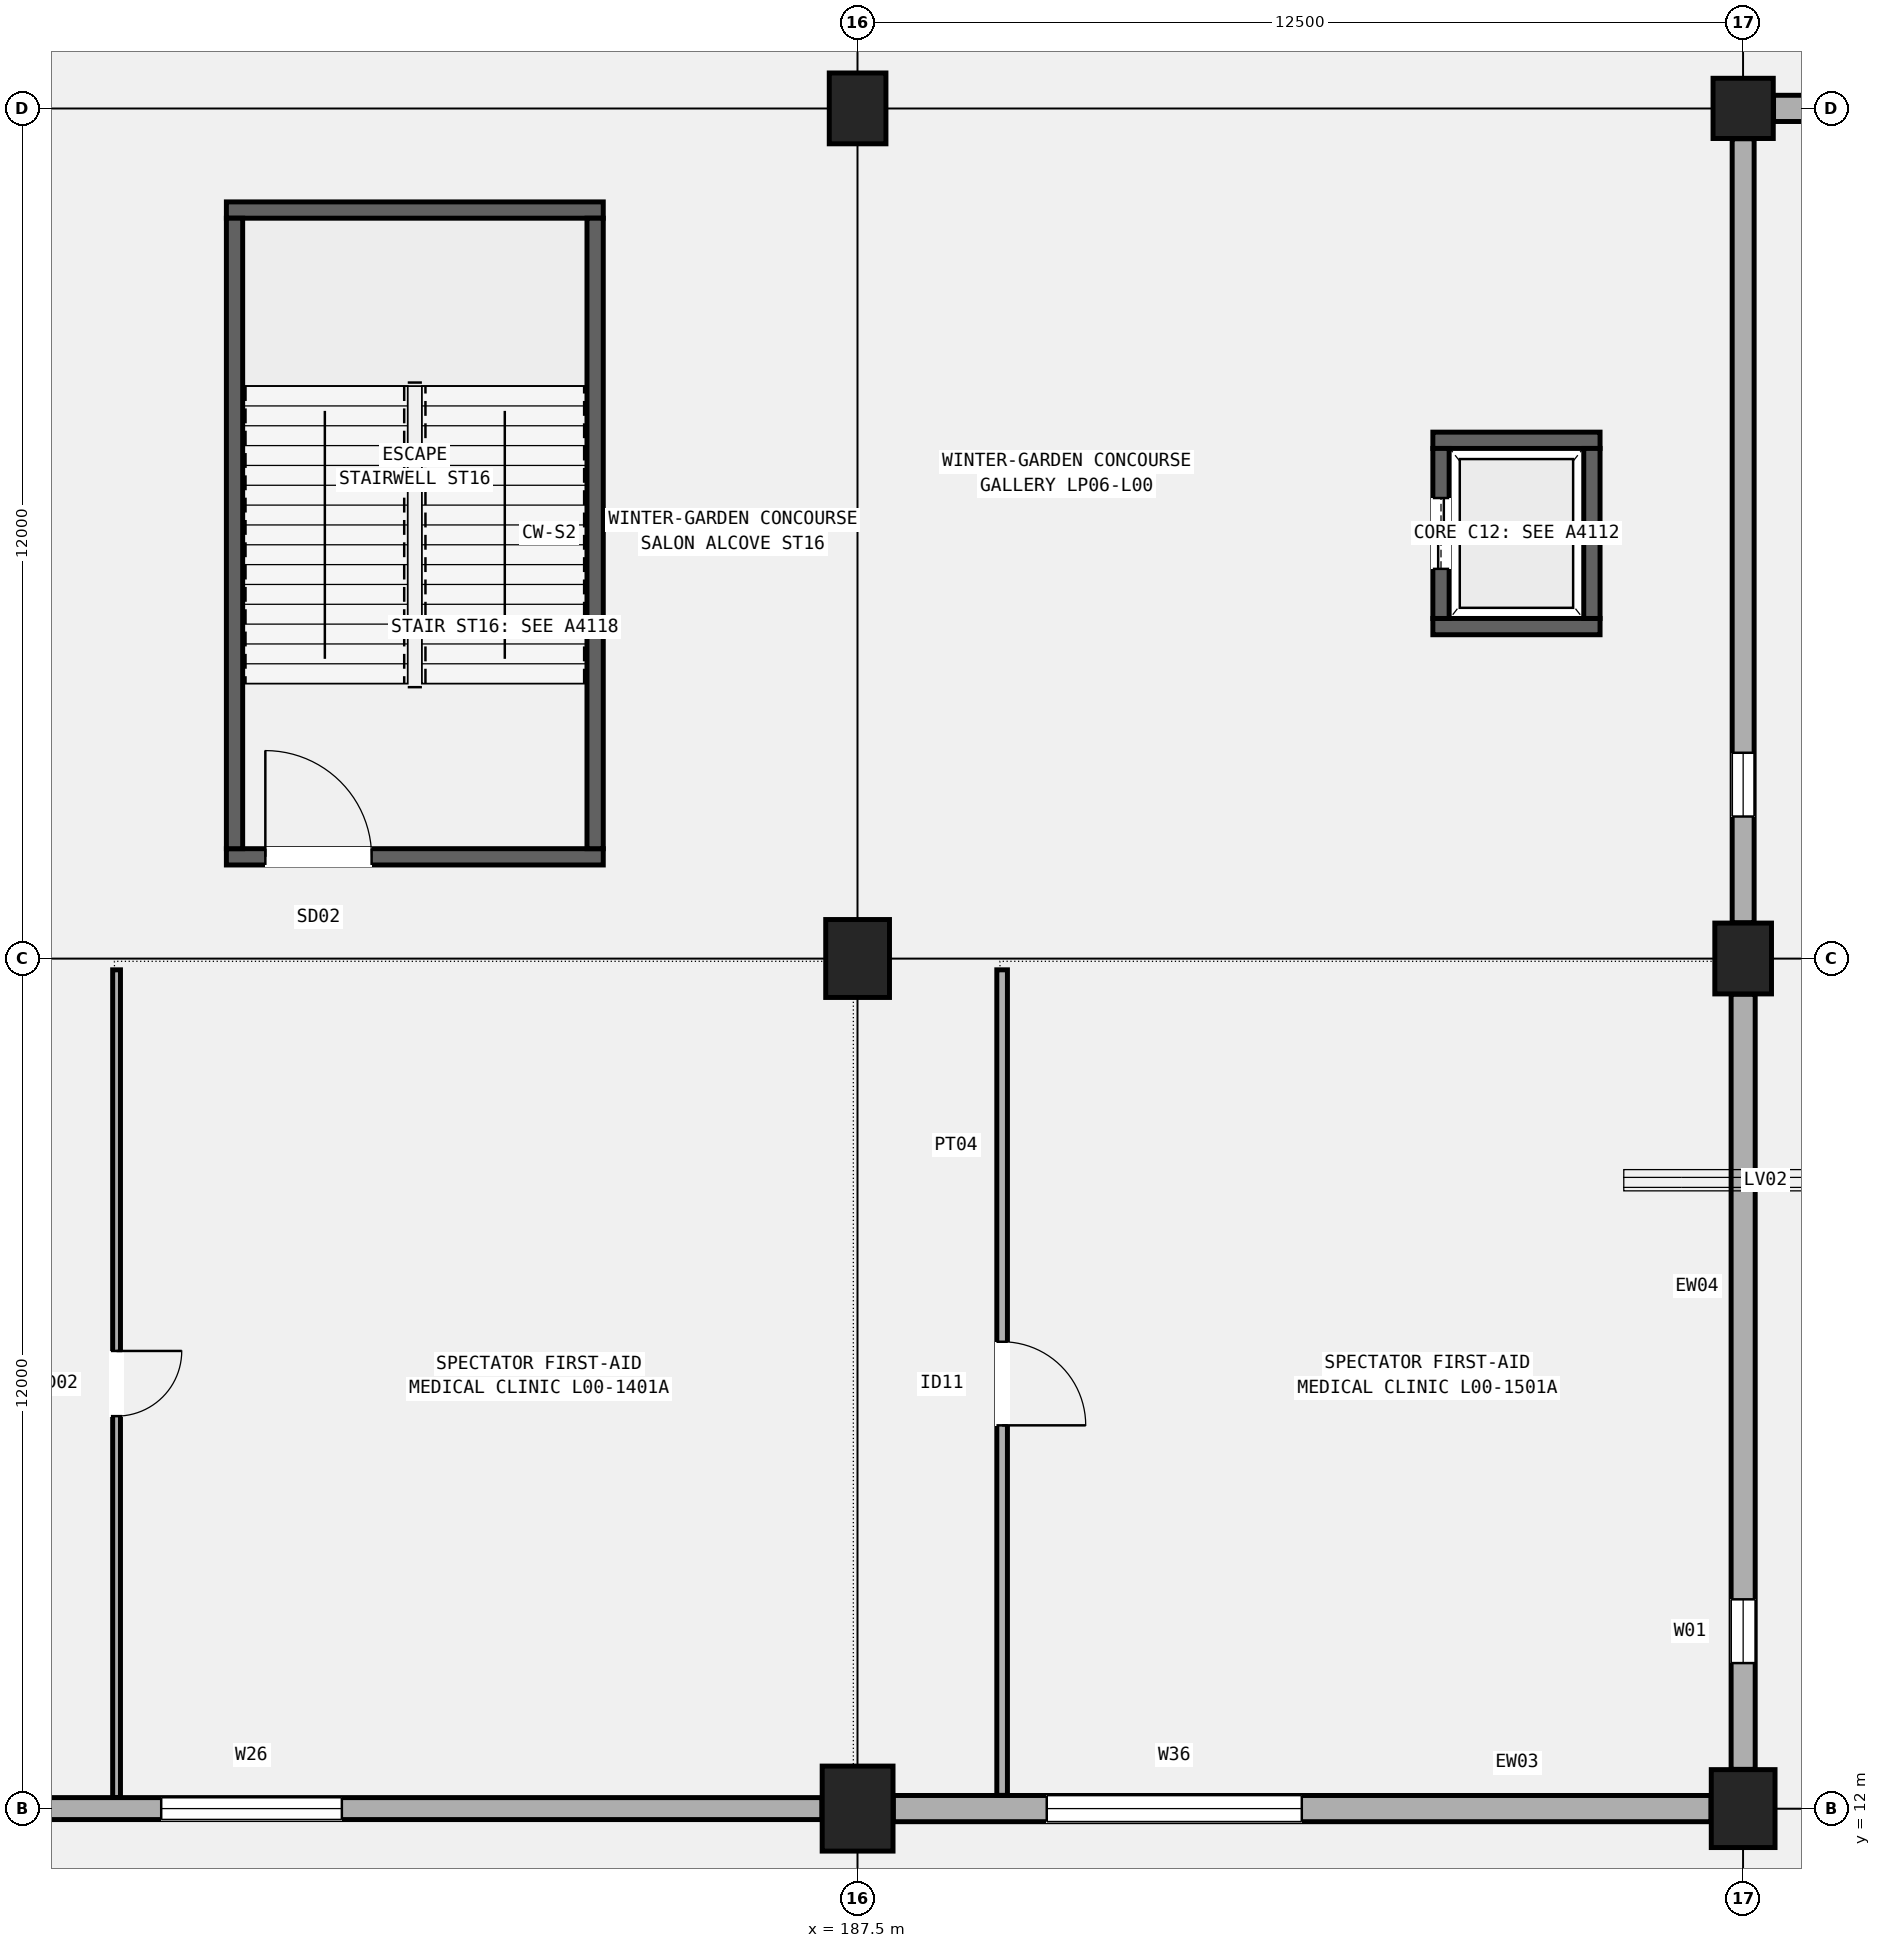
"""IFC4 building model, lengths in metres.
Left out: names, types, materials, properties, quantities, classifications, styles, units other than length and angle.
Written with IfcOpenShell. Run it as: python <this file> out.ifc"""

import sys

from ifc_helpers import new_model, si_unit, direction, frame, frame_2d, origin, origin_2d, place, context, subcontext, project, spatial, rectangle, circle, extrude, element, fill, save


model = new_model("IFC4")
c1 = context("Model", 3, precision=1e-05, world=origin(), true_north=direction((0.0, 1.0)))
c2 = subcontext(c1, "Body", "Model", "MODEL_VIEW")
j1 = project(units=[si_unit("LENGTHUNIT", "METRE"), si_unit("PLANEANGLEUNIT", "RADIAN")], contexts=[c1])
p1 = place(None, origin())
s1 = spatial("IfcSite", under=j1, at=p1, CompositionType="ELEMENT")
p2 = place(p1, origin())
s2 = spatial("IfcBuilding", under=s1, at=p2, CompositionType="ELEMENT")
p3 = place(p2, origin())
s3 = spatial("IfcBuildingStorey", under=s2, at=p3, CompositionType="ELEMENT", Elevation=0.0)
p4 = place(p3, frame((187.5, 12.0, 0.0), z_axis=(0.0, 0.0, 1.0), x_axis=(1.0, 0.0, 0.0)))
e1 = element("IfcColumn", 1, at=p4, inside=s3, PredefinedType="COLUMN", context=c2, shape_type="SweptSolid", body=[
    extrude(rectangle(XDim=1.0, YDim=1.2, at=origin_2d()), origin(), (0.0, 0.0, 1.0), 5.4),
])
p5 = place(p3, frame((187.5, 24.0, 0.0), z_axis=(0.0, 0.0, 1.0), x_axis=(1.0, 0.0, 0.0)))
e2 = element("IfcColumn", 2, at=p5, inside=s3, PredefinedType="COLUMN", context=c2, shape_type="SweptSolid", body=[
    extrude(rectangle(XDim=0.9, YDim=1.1, at=origin_2d()), origin(), (0.0, 0.0, 1.0), 5.4),
])
p6 = place(p3, frame((187.5, 36.0, 0.0), z_axis=(0.0, 0.0, 1.0), x_axis=(1.0, 0.0, 0.0)))
e3 = element("IfcColumn", 3, at=p6, inside=s3, PredefinedType="COLUMN", context=c2, shape_type="SweptSolid", body=[
    extrude(rectangle(XDim=0.8, YDim=1.0, at=origin_2d()), origin(), (0.0, 0.0, 1.0), 5.4),
])
p7 = place(p3, frame((200.0, 12.0, 0.0), z_axis=(0.0, 0.0, 1.0), x_axis=(1.0, 0.0, 0.0)))
e4 = element("IfcColumn", 4, at=p7, inside=s3, PredefinedType="COLUMN", context=c2, shape_type="SweptSolid", body=[
    extrude(rectangle(XDim=0.9, YDim=1.1, at=origin_2d()), origin(), (0.0, 0.0, 1.0), 5.4),
])
p8 = place(p3, frame((200.0, 24.0, 0.0), z_axis=(0.0, 0.0, 1.0), x_axis=(1.0, 0.0, 0.0)))
e5 = element("IfcColumn", 5, at=p8, inside=s3, PredefinedType="COLUMN", context=c2, shape_type="SweptSolid", body=[
    extrude(rectangle(XDim=0.8, YDim=1.0, at=origin_2d()), origin(), (0.0, 0.0, 1.0), 5.4),
])
p9 = place(p3, frame((200.0, 36.0, 0.0), z_axis=(0.0, 0.0, 1.0), x_axis=(1.0, 0.0, 0.0)))
e6 = element("IfcColumn", 6, at=p9, inside=s3, PredefinedType="COLUMN", context=c2, shape_type="SweptSolid", body=[
    extrude(circle(Radius=0.425, at=origin_2d()), origin(), (0.0, 0.0, 1.0), 5.4),
])
p10 = place(p3, frame((175.429, 12.0, 0.0), z_axis=(0.0, 0.0, 1.0), x_axis=(1.0, 0.0, 0.0)))
e7 = element("IfcWall", 7, at=p10, inside=s3, PredefinedType="SOLIDWALL", context=c2, shape_type="SweptSolid", body=[
    extrude(rectangle(XDim=11.567, YDim=0.31, at=frame_2d((5.784, 0.0))), origin(), (0.0, 0.0, 1.0), 4.34),
])
p11 = place(p10, frame((2.241, 0.0, 0.95)))
e8 = element("IfcOpeningElement", 8, at=p11, cuts=e7, PredefinedType="OPENING", context=c2, shape_type="SweptSolid", body=[
    extrude(rectangle(XDim=2.55, YDim=1.95, at=frame_2d((1.275, 0.975))), frame((0.0, 0.165, 0.0), z_axis=(0.0, -1.0, 0.0), x_axis=(1.0, 0.0, 0.0)), (0.0, 0.0, 1.0), 0.33),
])
p12 = place(p3, frame((188.004, 12.0, 0.0), z_axis=(0.0, 0.0, 1.0), x_axis=(1.0, 0.0, 0.0)))
e9 = element("IfcWall", 9, at=p12, inside=s3, PredefinedType="SOLIDWALL", context=c2, shape_type="SweptSolid", body=[
    extrude(rectangle(XDim=11.542, YDim=0.37, at=frame_2d((5.771, 0.0))), origin(), (0.0, 0.0, 1.0), 4.09),
])
p13 = place(p12, frame((2.166, 0.0, 0.95)))
e10 = element("IfcOpeningElement", 10, at=p13, cuts=e9, PredefinedType="OPENING", context=c2, shape_type="SweptSolid", body=[
    extrude(rectangle(XDim=3.6, YDim=2.15, at=frame_2d((1.8, 1.075))), frame((0.0, 0.195, 0.0), z_axis=(0.0, -1.0, 0.0), x_axis=(1.0, 0.0, 0.0)), (0.0, 0.0, 1.0), 0.39),
])
p14 = place(p3, frame((200.0, 12.554, 0.0), z_axis=(0.0, 0.0, 1.0), x_axis=(0.0, 1.0, 0.0)))
e11 = element("IfcWall", 11, at=p14, inside=s3, PredefinedType="SOLIDWALL", context=c2, shape_type="SweptSolid", body=[
    extrude(rectangle(XDim=10.942, YDim=0.34, at=frame_2d((5.471, 0.0))), origin(), (0.0, 0.0, 1.0), 4.44),
])
p15 = place(p14, frame((1.5, 0.0, 0.95)))
e12 = element("IfcOpeningElement", 12, at=p15, cuts=e11, PredefinedType="OPENING", context=c2, shape_type="SweptSolid", body=[
    extrude(rectangle(XDim=0.9, YDim=2.1, at=frame_2d((0.45, 1.05))), frame((0.0, 0.18, 0.0), z_axis=(0.0, -1.0, 0.0), x_axis=(1.0, 0.0, 0.0)), (0.0, 0.0, 1.0), 0.36),
])
p16 = place(p3, frame((200.0, 24.504, 0.0), z_axis=(0.0, 0.0, 1.0), x_axis=(0.0, 1.0, 0.0)))
e13 = element("IfcWall", 13, at=p16, inside=s3, PredefinedType="SOLIDWALL", context=c2, shape_type="SweptSolid", body=[
    extrude(rectangle(XDim=11.067, YDim=0.31, at=frame_2d((5.534, 0.0))), origin(), (0.0, 0.0, 1.0), 4.24),
])
p17 = place(p16, frame((1.5, 0.0, 0.95)))
e14 = element("IfcOpeningElement", 14, at=p17, cuts=e13, PredefinedType="OPENING", context=c2, shape_type="SweptSolid", body=[
    extrude(rectangle(XDim=0.9, YDim=2.4, at=frame_2d((0.45, 1.2))), frame((0.0, 0.165, 0.0), z_axis=(0.0, -1.0, 0.0), x_axis=(1.0, 0.0, 0.0)), (0.0, 0.0, 1.0), 0.33),
])
p18 = place(p3, frame((200.429, 36.0, 0.0), z_axis=(0.0, 0.0, 1.0), x_axis=(1.0, 0.0, 0.0)))
e15 = element("IfcWall", 15, at=p18, inside=s3, PredefinedType="SOLIDWALL", context=c2, shape_type="SweptSolid", body=[
    extrude(rectangle(XDim=11.067, YDim=0.37, at=frame_2d((5.534, 0.0))), origin(), (0.0, 0.0, 1.0), 4.34),
])
p19 = place(p18, frame((1.5, 0.0, 0.95)))
e16 = element("IfcOpeningElement", 16, at=p19, cuts=e15, PredefinedType="OPENING", context=c2, shape_type="SweptSolid", body=[
    extrude(rectangle(XDim=1.2, YDim=2.3, at=frame_2d((0.6, 1.15))), frame((0.0, 0.195, 0.0), z_axis=(0.0, -1.0, 0.0), x_axis=(1.0, 0.0, 0.0)), (0.0, 0.0, 1.0), 0.39),
])
p20 = place(p3, frame((178.59, 25.435, 0.0), z_axis=(0.0, 0.0, 1.0), x_axis=(1.0, 0.0, 0.0)))
e17 = element("IfcWall", 17, at=p20, inside=s3, PredefinedType="SHEAR", context=c2, shape_type="SweptSolid", body=[
    extrude(rectangle(XDim=5.32, YDim=0.23, at=frame_2d((2.66, 0.0))), origin(), (0.0, 0.0, 1.0), 5.14),
])
p21 = place(p20, frame((0.55, 0.0, 0.0)))
e18 = element("IfcOpeningElement", 18, at=p21, cuts=e17, PredefinedType="OPENING", context=c2, shape_type="SweptSolid", body=[
    extrude(rectangle(XDim=1.5, YDim=2.2, at=frame_2d((0.75, 1.1))), frame((0.0, 0.125, 0.0), z_axis=(0.0, -1.0, 0.0), x_axis=(1.0, 0.0, 0.0)), (0.0, 0.0, 1.0), 0.25),
])
p22 = place(p3, frame((178.59, 34.565, 0.0), z_axis=(0.0, 0.0, 1.0), x_axis=(1.0, 0.0, 0.0)))
e19 = element("IfcWall", 19, at=p22, inside=s3, PredefinedType="SHEAR", context=c2, shape_type="SweptSolid", body=[
    extrude(rectangle(XDim=5.32, YDim=0.23, at=frame_2d((2.66, 0.0))), origin(), (0.0, 0.0, 1.0), 5.14),
])
for number, where, z_axis, x_axis in (
    (20, (178.705, 25.55, 0.0), (0.0, 0.0, 1.0), (0.0, 1.0, 0.0)),
    (21, (183.795, 25.55, 0.0), (0.0, 0.0, 1.0), (0.0, 1.0, 0.0)),
):
    element("IfcWall", number, at=place(p3, frame(where, z_axis=z_axis, x_axis=x_axis)), inside=s3, PredefinedType="SHEAR", context=c2, shape_type="SweptSolid", body=[
        extrude(rectangle(XDim=8.9, YDim=0.23, at=frame_2d((4.45, 0.0))), origin(), (0.0, 0.0, 1.0), 5.14),
    ])
for number, where, z_axis, x_axis in (
    (22, (195.62, 28.685, 0.0), (0.0, 0.0, 1.0), (1.0, 0.0, 0.0)),
    (23, (195.62, 31.315, 0.0), (0.0, 0.0, 1.0), (1.0, 0.0, 0.0)),
):
    element("IfcWall", number, at=place(p3, frame(where, z_axis=z_axis, x_axis=x_axis)), inside=s3, PredefinedType="SHEAR", context=c2, shape_type="SweptSolid", body=[
        extrude(rectangle(XDim=2.36, YDim=0.23, at=frame_2d((1.18, 0.0))), origin(), (0.0, 0.0, 1.0), 5.14),
    ])
p23 = place(p3, frame((195.735, 28.8, 0.0), z_axis=(0.0, 0.0, 1.0), x_axis=(0.0, 1.0, 0.0)))
e24 = element("IfcWall", 24, at=p23, inside=s3, PredefinedType="SHEAR", context=c2, shape_type="SweptSolid", body=[
    extrude(rectangle(XDim=2.4, YDim=0.23, at=frame_2d((1.2, 0.0))), origin(), (0.0, 0.0, 1.0), 5.14),
])
p24 = place(p23, frame((0.7, 0.0, 0.0)))
e25 = element("IfcOpeningElement", 25, at=p24, cuts=e24, PredefinedType="OPENING", context=c2, shape_type="SweptSolid", body=[
    extrude(rectangle(XDim=1.0, YDim=2.15, at=frame_2d((0.5, 1.075))), frame((0.0, 0.125, 0.0), z_axis=(0.0, -1.0, 0.0), x_axis=(1.0, 0.0, 0.0)), (0.0, 0.0, 1.0), 0.25),
])
p25 = place(p3, frame((197.865, 28.8, 0.0), z_axis=(0.0, 0.0, 1.0), x_axis=(0.0, 1.0, 0.0)))
e26 = element("IfcWall", 26, at=p25, inside=s3, PredefinedType="SHEAR", context=c2, shape_type="SweptSolid", body=[
    extrude(rectangle(XDim=2.4, YDim=0.23, at=frame_2d((1.2, 0.0))), origin(), (0.0, 0.0, 1.0), 5.14),
])
p26 = place(p3, frame((177.04, 12.157, 0.0), z_axis=(0.0, 0.0, 1.0), x_axis=(0.0, 1.0, 0.0)))
e27 = element("IfcWall", 27, at=p26, inside=s3, PredefinedType="PARTITIONING", context=c2, shape_type="SweptSolid", body=[
    extrude(rectangle(XDim=11.683, YDim=0.11, at=frame_2d((5.842, 0.0))), origin(), (0.0, 0.0, 1.0), 4.52),
])
p27 = place(p26, frame((6.303, 0.0, 0.0), z_axis=(0.0, 0.0, 1.0), x_axis=(-1.0, 0.0, 0.0)))
e28 = element("IfcOpeningElement", 28, at=p27, cuts=e27, PredefinedType="OPENING", context=c2, shape_type="SweptSolid", body=[
    extrude(rectangle(XDim=0.92, YDim=2.1, at=frame_2d((0.46, 1.05))), frame((0.0, 0.065, 0.0), z_axis=(0.0, -1.0, 0.0), x_axis=(1.0, 0.0, 0.0)), (0.0, 0.0, 1.0), 0.13),
])
p28 = place(p3, frame((189.54, 12.187, 0.0), z_axis=(0.0, 0.0, 1.0), x_axis=(0.0, 1.0, 0.0)))
e29 = element("IfcWall", 29, at=p28, inside=s3, PredefinedType="PARTITIONING", context=c2, shape_type="SweptSolid", body=[
    extrude(rectangle(XDim=11.653, YDim=0.15, at=frame_2d((5.827, 0.0))), origin(), (0.0, 0.0, 1.0), 4.52),
])
p29 = place(p28, frame((6.403, 0.0, 0.0), z_axis=(0.0, 0.0, 1.0), x_axis=(-1.0, 0.0, 0.0)))
e30 = element("IfcOpeningElement", 30, at=p29, cuts=e29, PredefinedType="OPENING", context=c2, shape_type="SweptSolid", body=[
    extrude(rectangle(XDim=1.18, YDim=2.2, at=frame_2d((0.59, 1.1))), frame((0.0, 0.085, 0.0), z_axis=(0.0, -1.0, 0.0), x_axis=(1.0, 0.0, 0.0)), (0.0, 0.0, 1.0), 0.17),
])
p30 = place(p11, origin())
e31 = element("IfcWindow", 31, at=p30, inside=s3, PartitioningType="SINGLE_PANEL", PredefinedType="WINDOW", context=c2, shape_type="SweptSolid", body=[
    extrude(rectangle(XDim=2.55, YDim=1.95, at=frame_2d((1.275, 0.975))), frame((0.0, 0.03, 0.0), z_axis=(0.0, -1.0, 0.0), x_axis=(1.0, 0.0, 0.0)), (0.0, 0.0, 1.0), 0.06),
])
fill(e8, e31)
p31 = place(p13, origin())
e32 = element("IfcWindow", 32, at=p31, inside=s3, PartitioningType="SINGLE_PANEL", PredefinedType="WINDOW", context=c2, shape_type="SweptSolid", body=[
    extrude(rectangle(XDim=3.6, YDim=2.15, at=frame_2d((1.8, 1.075))), frame((0.0, 0.03, 0.0), z_axis=(0.0, -1.0, 0.0), x_axis=(1.0, 0.0, 0.0)), (0.0, 0.0, 1.0), 0.06),
])
fill(e10, e32)
p32 = place(p15, origin())
e33 = element("IfcWindow", 33, at=p32, inside=s3, PartitioningType="SINGLE_PANEL", PredefinedType="WINDOW", context=c2, shape_type="SweptSolid", body=[
    extrude(rectangle(XDim=0.9, YDim=2.1, at=frame_2d((0.45, 1.05))), frame((0.0, 0.03, 0.0), z_axis=(0.0, -1.0, 0.0), x_axis=(1.0, 0.0, 0.0)), (0.0, 0.0, 1.0), 0.06),
])
fill(e12, e33)
p33 = place(p17, origin())
e34 = element("IfcWindow", 34, at=p33, inside=s3, PartitioningType="SINGLE_PANEL", PredefinedType="WINDOW", context=c2, shape_type="SweptSolid", body=[
    extrude(rectangle(XDim=0.9, YDim=2.4, at=frame_2d((0.45, 1.2))), frame((0.0, 0.03, 0.0), z_axis=(0.0, -1.0, 0.0), x_axis=(1.0, 0.0, 0.0)), (0.0, 0.0, 1.0), 0.06),
])
fill(e14, e34)
p34 = place(p21, origin())
e35 = element("IfcDoor", 35, at=p34, inside=s3, OperationType="SINGLE_SWING_LEFT", PredefinedType="DOOR", context=c2, shape_type="SweptSolid", body=[
    extrude(rectangle(XDim=1.5, YDim=2.2, at=frame_2d((0.75, 1.1))), frame((0.0, 0.025, 0.0), z_axis=(0.0, -1.0, 0.0), x_axis=(1.0, 0.0, 0.0)), (0.0, 0.0, 1.0), 0.05),
])
fill(e18, e35)
p35 = place(p24, origin())
e36 = element("IfcDoor", 36, at=p35, inside=s3, OperationType="DOUBLE_DOOR_SLIDING", PredefinedType="DOOR", context=c2, shape_type="SweptSolid", body=[
    extrude(rectangle(XDim=1.0, YDim=2.15, at=frame_2d((0.5, 1.075))), frame((0.0, 0.025, 0.0), z_axis=(0.0, -1.0, 0.0), x_axis=(1.0, 0.0, 0.0)), (0.0, 0.0, 1.0), 0.05),
])
fill(e25, e36)
p36 = place(p27, origin())
e37 = element("IfcDoor", 37, at=p36, inside=s3, OperationType="SINGLE_SWING_LEFT", PredefinedType="DOOR", context=c2, shape_type="SweptSolid", body=[
    extrude(rectangle(XDim=0.92, YDim=2.1, at=frame_2d((0.46, 1.05))), frame((0.0, 0.025, 0.0), z_axis=(0.0, -1.0, 0.0), x_axis=(1.0, 0.0, 0.0)), (0.0, 0.0, 1.0), 0.05),
])
fill(e28, e37)
p37 = place(p29, origin())
e38 = element("IfcDoor", 38, at=p37, inside=s3, OperationType="SINGLE_SWING_RIGHT", PredefinedType="DOOR", context=c2, shape_type="SweptSolid", body=[
    extrude(rectangle(XDim=1.18, YDim=2.2, at=frame_2d((0.59, 1.1))), frame((0.0, 0.025, 0.0), z_axis=(0.0, -1.0, 0.0), x_axis=(1.0, 0.0, 0.0)), (0.0, 0.0, 1.0), 0.05),
])
fill(e30, e38)
save(model, sys.argv[1])
